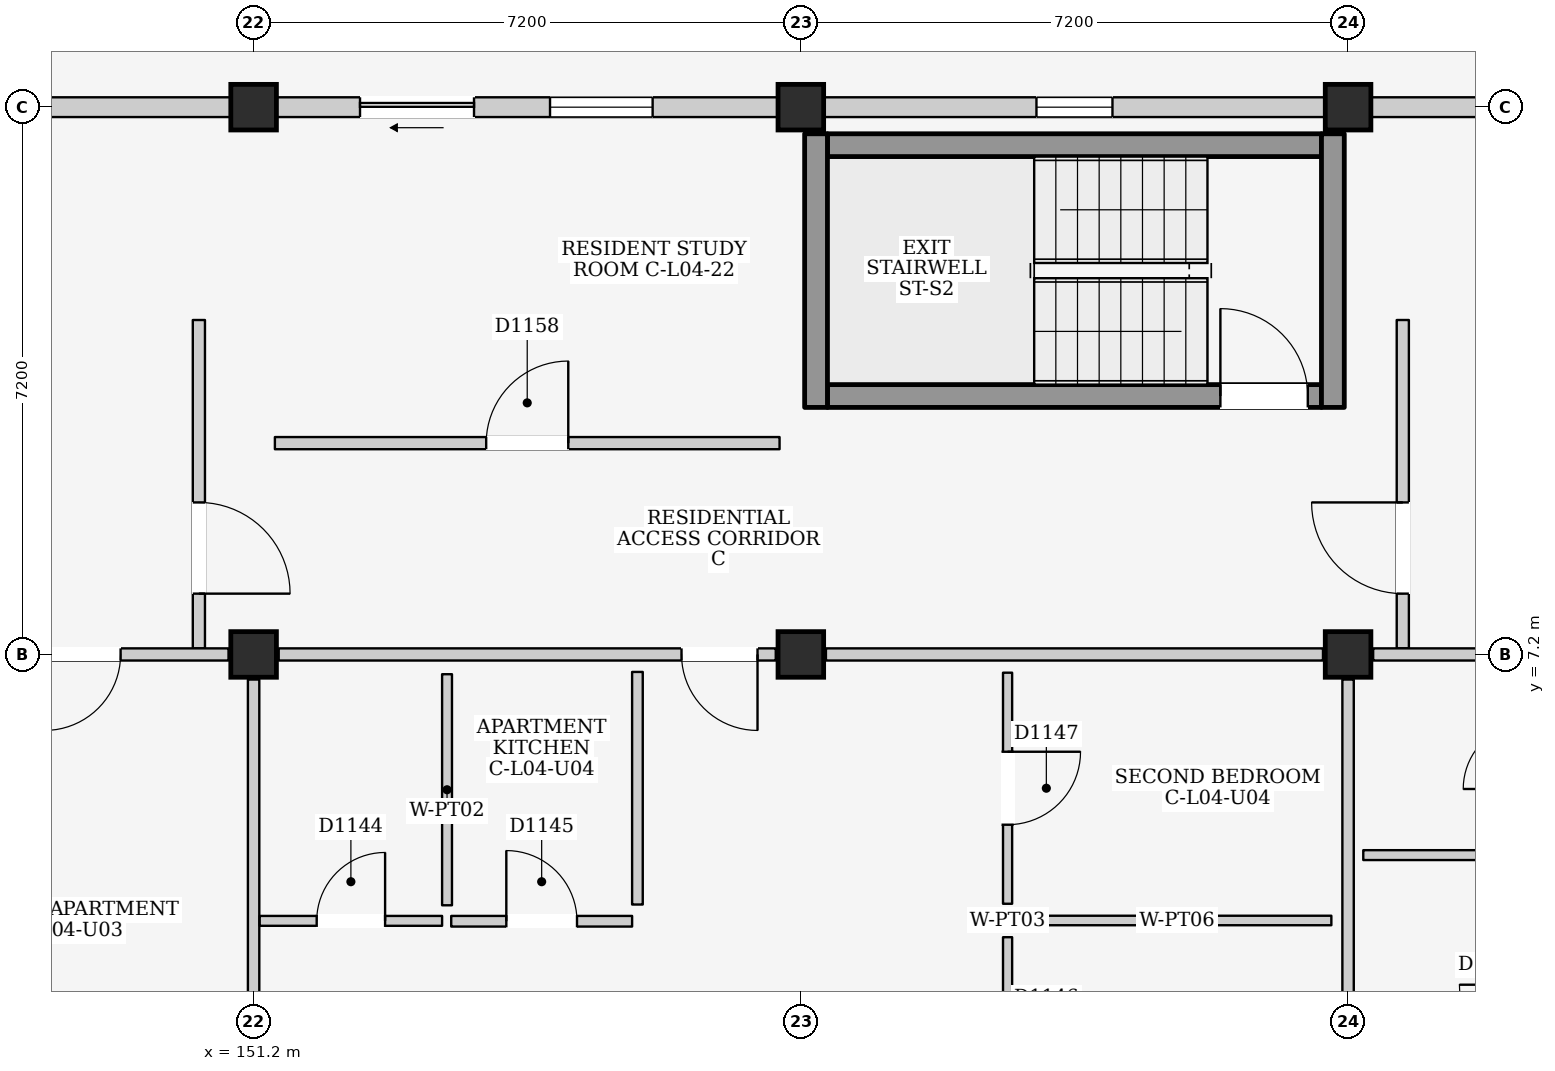
"""IFC4 building model, lengths in metres.
Left out: names, types, materials, properties, quantities, classifications, styles, units other than length and angle.
Written with IfcOpenShell. Run it as: python <this file> out.ifc"""

import sys

from ifc_helpers import new_model, si_unit, direction, frame, frame_2d, origin, origin_2d, place, context, subcontext, project, spatial, rectangle, extrude, element, fill, save


model = new_model("IFC4")
c1 = context("Model", 3, precision=1e-05, world=origin(), true_north=direction((0.0, 1.0)))
c2 = subcontext(c1, "Body", "Model", "MODEL_VIEW")
j1 = project(units=[si_unit("LENGTHUNIT", "METRE"), si_unit("PLANEANGLEUNIT", "RADIAN")], contexts=[c1])
p1 = place(None, origin())
s1 = spatial("IfcSite", under=j1, at=p1, CompositionType="ELEMENT")
p2 = place(p1, origin())
s2 = spatial("IfcBuilding", under=s1, at=p2, CompositionType="ELEMENT")
p3 = place(p2, frame((0.0, 0.0, 15.4)))
s3 = spatial("IfcBuildingStorey", under=s2, at=p3, CompositionType="ELEMENT", Elevation=15.4)
for number, where, z_axis, x_axis in (
    (1, (151.2, 7.2, 0.0), (0.0, 0.0, 1.0), (1.0, 0.0, 0.0)),
    (2, (151.2, 14.4, 0.0), (0.0, 0.0, 1.0), (1.0, 0.0, 0.0)),
    (3, (158.4, 7.2, 0.0), (0.0, 0.0, 1.0), (1.0, 0.0, 0.0)),
    (4, (158.4, 14.4, 0.0), (0.0, 0.0, 1.0), (1.0, 0.0, 0.0)),
    (5, (165.6, 7.2, 0.0), (0.0, 0.0, 1.0), (1.0, 0.0, 0.0)),
    (6, (165.6, 14.4, 0.0), (0.0, 0.0, 1.0), (1.0, 0.0, 0.0)),
):
    element("IfcColumn", number, at=place(p3, frame(where, z_axis=z_axis, x_axis=x_axis)), inside=s3, PredefinedType="COLUMN", context=c2, shape_type="SweptSolid", body=[
        extrude(rectangle(XDim=0.6, YDim=0.6, at=origin_2d()), origin(), (0.0, 0.0, 1.0), 3.2),
    ])
p4 = place(p3, frame((144.3, 14.4, 0.0), z_axis=(0.0, 0.0, 1.0), x_axis=(1.0, 0.0, 0.0)))
e7 = element("IfcWall", 7, at=p4, inside=s3, PredefinedType="ELEMENTEDWALL", context=c2, shape_type="SweptSolid", body=[
    extrude(rectangle(XDim=6.6, YDim=0.26, at=frame_2d((3.3, 0.0))), origin(), (0.0, 0.0, 1.0), 2.335),
])
p5 = place(p4, frame((2.8, 0.0, 1.2)))
e8 = element("IfcOpeningElement", 8, at=p5, cuts=e7, PredefinedType="OPENING", context=c2, shape_type="SweptSolid", body=[
    extrude(rectangle(XDim=1.0, YDim=0.9, at=frame_2d((0.5, 0.45))), frame((0.0, 0.145, 0.0), z_axis=(0.0, -1.0, 0.0), x_axis=(1.0, 0.0, 0.0)), (0.0, 0.0, 1.0), 0.29),
])
p6 = place(p3, frame((151.5, 14.4, 0.0), z_axis=(0.0, 0.0, 1.0), x_axis=(1.0, 0.0, 0.0)))
e9 = element("IfcWall", 9, at=p6, inside=s3, PredefinedType="ELEMENTEDWALL", context=c2, shape_type="SweptSolid", body=[
    extrude(rectangle(XDim=6.6, YDim=0.26, at=frame_2d((3.3, 0.0))), origin(), (0.0, 0.0, 1.0), 2.335),
])
p7 = place(p6, frame((1.1, 0.0, 0.0)))
e10 = element("IfcOpeningElement", 10, at=p7, cuts=e9, PredefinedType="OPENING", context=c2, shape_type="SweptSolid", body=[
    extrude(rectangle(XDim=1.5, YDim=2.12, at=frame_2d((0.75, 1.06))), frame((0.0, 0.145, 0.0), z_axis=(0.0, -1.0, 0.0), x_axis=(1.0, 0.0, 0.0)), (0.0, 0.0, 1.0), 0.29),
])
p8 = place(p6, frame((3.6, 0.0, 0.725)))
e11 = element("IfcOpeningElement", 11, at=p8, cuts=e9, PredefinedType="OPENING", context=c2, shape_type="SweptSolid", body=[
    extrude(rectangle(XDim=1.35, YDim=1.5, at=frame_2d((0.675, 0.75))), frame((0.0, 0.145, 0.0), z_axis=(0.0, -1.0, 0.0), x_axis=(1.0, 0.0, 0.0)), (0.0, 0.0, 1.0), 0.29),
])
p9 = place(p3, frame((158.7, 14.4, 0.0), z_axis=(0.0, 0.0, 1.0), x_axis=(1.0, 0.0, 0.0)))
e12 = element("IfcWall", 12, at=p9, inside=s3, PredefinedType="ELEMENTEDWALL", context=c2, shape_type="SweptSolid", body=[
    extrude(rectangle(XDim=6.6, YDim=0.26, at=frame_2d((3.3, 0.0))), origin(), (0.0, 0.0, 1.0), 2.335),
])
p10 = place(p9, frame((2.8, 0.0, 1.2)))
e13 = element("IfcOpeningElement", 13, at=p10, cuts=e12, PredefinedType="OPENING", context=c2, shape_type="SweptSolid", body=[
    extrude(rectangle(XDim=1.0, YDim=0.9, at=frame_2d((0.5, 0.45))), frame((0.0, 0.145, 0.0), z_axis=(0.0, -1.0, 0.0), x_axis=(1.0, 0.0, 0.0)), (0.0, 0.0, 1.0), 0.29),
])
p11 = place(p3, frame((165.9, 14.4, 0.0), z_axis=(0.0, 0.0, 1.0), x_axis=(1.0, 0.0, 0.0)))
e14 = element("IfcWall", 14, at=p11, inside=s3, PredefinedType="ELEMENTEDWALL", context=c2, shape_type="SweptSolid", body=[
    extrude(rectangle(XDim=6.6, YDim=0.26, at=frame_2d((3.3, 0.0))), origin(), (0.0, 0.0, 1.0), 2.335),
])
p12 = place(p11, frame((2.8, 0.0, 1.2)))
e15 = element("IfcOpeningElement", 15, at=p12, cuts=e14, PredefinedType="OPENING", context=c2, shape_type="SweptSolid", body=[
    extrude(rectangle(XDim=1.0, YDim=0.9, at=frame_2d((0.5, 0.45))), frame((0.0, 0.145, 0.0), z_axis=(0.0, -1.0, 0.0), x_axis=(1.0, 0.0, 0.0)), (0.0, 0.0, 1.0), 0.29),
])
p13 = place(p3, frame((150.48, 7.28, 0.0), z_axis=(0.0, 0.0, 1.0), x_axis=(0.0, 1.0, 0.0)))
e16 = element("IfcWall", 16, at=p13, inside=s3, PredefinedType="PARTITIONING", context=c2, shape_type="SweptSolid", body=[
    extrude(rectangle(XDim=4.32, YDim=0.16, at=frame_2d((2.16, 0.0))), origin(), (0.0, 0.0, 1.0), 2.95),
])
p14 = place(p13, frame((0.72, 0.0, 0.0)))
e17 = element("IfcOpeningElement", 17, at=p14, cuts=e16, PredefinedType="OPENING", context=c2, shape_type="SweptSolid", body=[
    extrude(rectangle(XDim=1.2, YDim=2.2, at=frame_2d((0.6, 1.1))), frame((0.0, 0.095, 0.0), z_axis=(0.0, -1.0, 0.0), x_axis=(1.0, 0.0, 0.0)), (0.0, 0.0, 1.0), 0.19),
])
p15 = place(p3, frame((158.75, 10.6, 0.0), z_axis=(0.0, 0.0, 1.0), x_axis=(1.0, 0.0, 0.0)))
e18 = element("IfcWall", 18, at=p15, inside=s3, PredefinedType="SHEAR", context=c2, shape_type="SweptSolid", body=[
    extrude(rectangle(XDim=6.5, YDim=0.3, at=frame_2d((3.25, 0.0))), origin(), (0.0, 0.0, 1.0), 2.95),
])
p16 = place(p15, frame((5.17, 0.0, 0.0)))
e19 = element("IfcOpeningElement", 19, at=p16, cuts=e18, PredefinedType="OPENING", context=c2, shape_type="SweptSolid", body=[
    extrude(rectangle(XDim=1.15, YDim=2.2, at=frame_2d((0.575, 1.1))), frame((0.0, 0.165, 0.0), z_axis=(0.0, -1.0, 0.0), x_axis=(1.0, 0.0, 0.0)), (0.0, 0.0, 1.0), 0.33),
])
p17 = place(p3, frame((158.75, 13.9, 0.0), z_axis=(0.0, 0.0, 1.0), x_axis=(1.0, 0.0, 0.0)))
e20 = element("IfcWall", 20, at=p17, inside=s3, PredefinedType="SHEAR", context=c2, shape_type="SweptSolid", body=[
    extrude(rectangle(XDim=6.5, YDim=0.3, at=frame_2d((3.25, 0.0))), origin(), (0.0, 0.0, 1.0), 2.95),
])
for number, where, z_axis, x_axis in (
    (21, (158.6, 10.45, 0.0), (0.0, 0.0, 1.0), (0.0, 1.0, 0.0)),
    (22, (165.4, 10.45, 0.0), (0.0, 0.0, 1.0), (0.0, 1.0, 0.0)),
):
    element("IfcWall", number, at=place(p3, frame(where, z_axis=z_axis, x_axis=x_axis)), inside=s3, PredefinedType="SHEAR", context=c2, shape_type="SweptSolid", body=[
        extrude(rectangle(XDim=3.6, YDim=0.3, at=frame_2d((1.8, 0.0))), origin(), (0.0, 0.0, 1.0), 2.95),
    ])
p18 = place(p3, frame((166.32, 7.28, 0.0), z_axis=(0.0, 0.0, 1.0), x_axis=(0.0, 1.0, 0.0)))
e23 = element("IfcWall", 23, at=p18, inside=s3, PredefinedType="PARTITIONING", context=c2, shape_type="SweptSolid", body=[
    extrude(rectangle(XDim=4.32, YDim=0.16, at=frame_2d((2.16, 0.0))), origin(), (0.0, 0.0, 1.0), 2.95),
])
p19 = place(p18, frame((0.72, 0.0, 0.0)))
e24 = element("IfcOpeningElement", 24, at=p19, cuts=e23, PredefinedType="OPENING", context=c2, shape_type="SweptSolid", body=[
    extrude(rectangle(XDim=1.2, YDim=2.2, at=frame_2d((0.6, 1.1))), frame((0.0, 0.095, 0.0), z_axis=(0.0, -1.0, 0.0), x_axis=(1.0, 0.0, 0.0)), (0.0, 0.0, 1.0), 0.19),
])
p20 = place(p3, frame((144.33, 7.2, 0.0), z_axis=(0.0, 0.0, 1.0), x_axis=(1.0, 0.0, 0.0)))
e25 = element("IfcWall", 25, at=p20, inside=s3, PredefinedType="PARTITIONING", context=c2, shape_type="SweptSolid", body=[
    extrude(rectangle(XDim=6.54, YDim=0.16, at=frame_2d((3.27, 0.0))), origin(), (0.0, 0.0, 1.0), 2.335),
])
p21 = place(p20, frame((4.12, 0.0, 0.0)))
e26 = element("IfcOpeningElement", 26, at=p21, cuts=e25, PredefinedType="OPENING", context=c2, shape_type="SweptSolid", body=[
    extrude(rectangle(XDim=1.0, YDim=2.15, at=frame_2d((0.5, 1.075))), frame((0.0, 0.095, 0.0), z_axis=(0.0, -1.0, 0.0), x_axis=(1.0, 0.0, 0.0)), (0.0, 0.0, 1.0), 0.19),
])
p22 = place(p3, frame((151.2, 0.33, 0.0), z_axis=(0.0, 0.0, 1.0), x_axis=(0.0, 1.0, 0.0)))
e27 = element("IfcWall", 27, at=p22, inside=s3, PredefinedType="PARTITIONING", context=c2, shape_type="SweptSolid", body=[
    extrude(rectangle(XDim=6.54, YDim=0.15, at=frame_2d((3.27, 0.0))), origin(), (0.0, 0.0, 1.0), 2.385),
])
p23 = place(p3, frame((151.53, 7.2, 0.0), z_axis=(0.0, 0.0, 1.0), x_axis=(1.0, 0.0, 0.0)))
e28 = element("IfcWall", 28, at=p23, inside=s3, PredefinedType="PARTITIONING", context=c2, shape_type="SweptSolid", body=[
    extrude(rectangle(XDim=6.54, YDim=0.16, at=frame_2d((3.27, 0.0))), origin(), (0.0, 0.0, 1.0), 2.335),
])
p24 = place(p23, frame((5.3, 0.0, 0.0)))
e29 = element("IfcOpeningElement", 29, at=p24, cuts=e28, PredefinedType="OPENING", context=c2, shape_type="SweptSolid", body=[
    extrude(rectangle(XDim=1.0, YDim=2.15, at=frame_2d((0.5, 1.075))), frame((0.0, 0.095, 0.0), z_axis=(0.0, -1.0, 0.0), x_axis=(1.0, 0.0, 0.0)), (0.0, 0.0, 1.0), 0.19),
])
p25 = place(p3, frame((158.73, 7.2, 0.0), z_axis=(0.0, 0.0, 1.0), x_axis=(1.0, 0.0, 0.0)))
e30 = element("IfcWall", 30, at=p25, inside=s3, PredefinedType="PARTITIONING", context=c2, shape_type="SweptSolid", body=[
    extrude(rectangle(XDim=6.54, YDim=0.16, at=frame_2d((3.27, 0.0))), origin(), (0.0, 0.0, 1.0), 2.335),
])
p26 = place(p3, frame((165.6, 0.33, 0.0), z_axis=(0.0, 0.0, 1.0), x_axis=(0.0, 1.0, 0.0)))
e31 = element("IfcWall", 31, at=p26, inside=s3, PredefinedType="PARTITIONING", context=c2, shape_type="SweptSolid", body=[
    extrude(rectangle(XDim=6.54, YDim=0.15, at=frame_2d((3.27, 0.0))), origin(), (0.0, 0.0, 1.0), 2.385),
])
p27 = place(p3, frame((151.28, 3.695, 0.0), z_axis=(0.0, 0.0, 1.0), x_axis=(1.0, 0.0, 0.0)))
e32 = element("IfcWall", 32, at=p27, inside=s3, PredefinedType="PARTITIONING", context=c2, shape_type="SweptSolid", body=[
    extrude(rectangle(XDim=2.4, YDim=0.13, at=frame_2d((1.2, 0.0))), origin(), (0.0, 0.0, 1.0), 2.95),
])
p28 = place(p27, frame((0.75, 0.0, 0.0)))
e33 = element("IfcOpeningElement", 33, at=p28, cuts=e32, PredefinedType="OPENING", context=c2, shape_type="SweptSolid", body=[
    extrude(rectangle(XDim=0.9, YDim=2.1, at=frame_2d((0.45, 1.05))), frame((0.0, 0.08, 0.0), z_axis=(0.0, -1.0, 0.0), x_axis=(1.0, 0.0, 0.0)), (0.0, 0.0, 1.0), 0.16),
])
p29 = place(p3, frame((153.745, 3.9, 0.0), z_axis=(0.0, 0.0, 1.0), x_axis=(0.0, 1.0, 0.0)))
e34 = element("IfcWall", 34, at=p29, inside=s3, PredefinedType="PARTITIONING", context=c2, shape_type="SweptSolid", body=[
    extrude(rectangle(XDim=3.04, YDim=0.13, at=frame_2d((1.52, 0.0))), origin(), (0.0, 0.0, 1.0), 2.95),
])
p30 = place(p3, frame((153.8, 3.69, 0.0), z_axis=(0.0, 0.0, 1.0), x_axis=(1.0, 0.0, 0.0)))
e35 = element("IfcWall", 35, at=p30, inside=s3, PredefinedType="PARTITIONING", context=c2, shape_type="SweptSolid", body=[
    extrude(rectangle(XDim=2.38, YDim=0.14, at=frame_2d((1.19, 0.0))), origin(), (0.0, 0.0, 1.0), 2.95),
])
p31 = place(p30, frame((0.725, 0.0, 0.0)))
e36 = element("IfcOpeningElement", 36, at=p31, cuts=e35, PredefinedType="OPENING", context=c2, shape_type="SweptSolid", body=[
    extrude(rectangle(XDim=0.93, YDim=2.14, at=frame_2d((0.465, 1.07))), frame((0.0, 0.085, 0.0), z_axis=(0.0, -1.0, 0.0), x_axis=(1.0, 0.0, 0.0)), (0.0, 0.0, 1.0), 0.17),
])
p32 = place(p3, frame((156.25, 3.91, 0.0), z_axis=(0.0, 0.0, 1.0), x_axis=(0.0, 1.0, 0.0)))
e37 = element("IfcWall", 37, at=p32, inside=s3, PredefinedType="PARTITIONING", context=c2, shape_type="SweptSolid", body=[
    extrude(rectangle(XDim=3.06, YDim=0.14, at=frame_2d((1.53, 0.0))), origin(), (0.0, 0.0, 1.0), 2.95),
])
p33 = place(p3, frame((161.12, 0.44, 0.0), z_axis=(0.0, 0.0, 1.0), x_axis=(0.0, 1.0, 0.0)))
e38 = element("IfcWall", 38, at=p33, inside=s3, PredefinedType="PARTITIONING", context=c2, shape_type="SweptSolid", body=[
    extrude(rectangle(XDim=3.04, YDim=0.12, at=frame_2d((1.52, 0.0))), origin(), (0.0, 0.0, 1.0), 2.95),
])
p34 = place(p33, frame((1.045, 0.0, 0.0)))
e39 = element("IfcOpeningElement", 39, at=p34, cuts=e38, PredefinedType="OPENING", context=c2, shape_type="SweptSolid", body=[
    extrude(rectangle(XDim=0.95, YDim=2.15, at=frame_2d((0.475, 1.075))), frame((0.0, 0.075, 0.0), z_axis=(0.0, -1.0, 0.0), x_axis=(1.0, 0.0, 0.0)), (0.0, 0.0, 1.0), 0.15),
])
p35 = place(p3, frame((161.32, 3.7, 0.0), z_axis=(0.0, 0.0, 1.0), x_axis=(1.0, 0.0, 0.0)))
e40 = element("IfcWall", 40, at=p35, inside=s3, PredefinedType="PARTITIONING", context=c2, shape_type="SweptSolid", body=[
    extrude(rectangle(XDim=4.06, YDim=0.125, at=frame_2d((2.03, 0.0))), origin(), (0.0, 0.0, 1.0), 2.95),
])
p36 = place(p3, frame((161.12, 3.92, 0.0), z_axis=(0.0, 0.0, 1.0), x_axis=(0.0, 1.0, 0.0)))
e41 = element("IfcWall", 41, at=p36, inside=s3, PredefinedType="PARTITIONING", context=c2, shape_type="SweptSolid", body=[
    extrude(rectangle(XDim=3.04, YDim=0.12, at=frame_2d((1.52, 0.0))), origin(), (0.0, 0.0, 1.0), 2.95),
])
p37 = place(p36, frame((1.04, 0.0, 0.0)))
e42 = element("IfcOpeningElement", 42, at=p37, cuts=e41, PredefinedType="OPENING", context=c2, shape_type="SweptSolid", body=[
    extrude(rectangle(XDim=0.96, YDim=2.15, at=frame_2d((0.48, 1.075))), frame((0.0, 0.075, 0.0), z_axis=(0.0, -1.0, 0.0), x_axis=(1.0, 0.0, 0.0)), (0.0, 0.0, 1.0), 0.15),
])
p38 = place(p3, frame((165.93, 7.2, 0.0), z_axis=(0.0, 0.0, 1.0), x_axis=(1.0, 0.0, 0.0)))
e43 = element("IfcWall", 43, at=p38, inside=s3, PredefinedType="PARTITIONING", context=c2, shape_type="SweptSolid", body=[
    extrude(rectangle(XDim=6.54, YDim=0.16, at=frame_2d((3.27, 0.0))), origin(), (0.0, 0.0, 1.0), 2.335),
])
p39 = place(p38, frame((4.12, 0.0, 0.0)))
e44 = element("IfcOpeningElement", 44, at=p39, cuts=e43, PredefinedType="OPENING", context=c2, shape_type="SweptSolid", body=[
    extrude(rectangle(XDim=1.0, YDim=2.15, at=frame_2d((0.5, 1.075))), frame((0.0, 0.095, 0.0), z_axis=(0.0, -1.0, 0.0), x_axis=(1.0, 0.0, 0.0)), (0.0, 0.0, 1.0), 0.19),
])
p40 = place(p3, frame((165.8, 4.56, 0.0), z_axis=(0.0, 0.0, 1.0), x_axis=(1.0, 0.0, 0.0)))
e45 = element("IfcWall", 45, at=p40, inside=s3, PredefinedType="PARTITIONING", context=c2, shape_type="SweptSolid", body=[
    extrude(rectangle(XDim=2.05, YDim=0.13, at=frame_2d((1.025, 0.0))), origin(), (0.0, 0.0, 1.0), 2.95),
])
p41 = place(p3, frame((151.48, 9.98, 0.0), z_axis=(0.0, 0.0, 1.0), x_axis=(1.0, 0.0, 0.0)))
e46 = element("IfcWall", 46, at=p41, inside=s3, PredefinedType="PARTITIONING", context=c2, shape_type="SweptSolid", body=[
    extrude(rectangle(XDim=6.64, YDim=0.16, at=frame_2d((3.32, 0.0))), origin(), (0.0, 0.0, 1.0), 2.95),
])
p42 = place(p41, frame((2.78, 0.0, 0.0)))
e47 = element("IfcOpeningElement", 47, at=p42, cuts=e46, PredefinedType="OPENING", context=c2, shape_type="SweptSolid", body=[
    extrude(rectangle(XDim=1.08, YDim=2.22, at=frame_2d((0.54, 1.11))), frame((0.0, 0.095, 0.0), z_axis=(0.0, -1.0, 0.0), x_axis=(1.0, 0.0, 0.0)), (0.0, 0.0, 1.0), 0.19),
])
p43 = place(p7, frame((1.5, 0.0, 0.0), z_axis=(0.0, 0.0, 1.0), x_axis=(-1.0, 0.0, 0.0)))
e48 = element("IfcDoor", 48, at=p43, inside=s3, OperationType="SLIDING_TO_LEFT", PredefinedType="DOOR", context=c2, shape_type="SweptSolid", body=[
    extrude(rectangle(XDim=1.5, YDim=2.12, at=frame_2d((0.75, 1.06))), frame((0.0, 0.025, 0.0), z_axis=(0.0, -1.0, 0.0), x_axis=(1.0, 0.0, 0.0)), (0.0, 0.0, 1.0), 0.05),
])
fill(e10, e48)
p44 = place(p8, origin())
e49 = element("IfcWindow", 49, at=p44, inside=s3, PartitioningType="SINGLE_PANEL", PredefinedType="WINDOW", context=c2, shape_type="SweptSolid", body=[
    extrude(rectangle(XDim=1.35, YDim=1.5, at=frame_2d((0.675, 0.75))), frame((0.0, 0.03, 0.0), z_axis=(0.0, -1.0, 0.0), x_axis=(1.0, 0.0, 0.0)), (0.0, 0.0, 1.0), 0.06),
])
fill(e11, e49)
p45 = place(p10, origin())
e50 = element("IfcWindow", 50, at=p45, inside=s3, PartitioningType="SINGLE_PANEL", PredefinedType="WINDOW", context=c2, shape_type="SweptSolid", body=[
    extrude(rectangle(XDim=1.0, YDim=0.9, at=frame_2d((0.5, 0.45))), frame((0.0, 0.03, 0.0), z_axis=(0.0, -1.0, 0.0), x_axis=(1.0, 0.0, 0.0)), (0.0, 0.0, 1.0), 0.06),
])
fill(e13, e50)
p46 = place(p14, frame((1.2, 0.0, 0.0), z_axis=(0.0, 0.0, 1.0), x_axis=(-1.0, 0.0, 0.0)))
e51 = element("IfcDoor", 51, at=p46, inside=s3, OperationType="SINGLE_SWING_RIGHT", PredefinedType="DOOR", context=c2, shape_type="SweptSolid", body=[
    extrude(rectangle(XDim=1.2, YDim=2.2, at=frame_2d((0.6, 1.1))), frame((0.0, 0.025, 0.0), z_axis=(0.0, -1.0, 0.0), x_axis=(1.0, 0.0, 0.0)), (0.0, 0.0, 1.0), 0.05),
])
fill(e17, e51)
p47 = place(p16, origin())
e52 = element("IfcDoor", 52, at=p47, inside=s3, OperationType="SINGLE_SWING_LEFT", PredefinedType="DOOR", context=c2, shape_type="SweptSolid", body=[
    extrude(rectangle(XDim=1.15, YDim=2.2, at=frame_2d((0.575, 1.1))), frame((0.0, 0.025, 0.0), z_axis=(0.0, -1.0, 0.0), x_axis=(1.0, 0.0, 0.0)), (0.0, 0.0, 1.0), 0.05),
])
fill(e19, e52)
p48 = place(p19, origin())
e53 = element("IfcDoor", 53, at=p48, inside=s3, OperationType="SINGLE_SWING_RIGHT", PredefinedType="DOOR", context=c2, shape_type="SweptSolid", body=[
    extrude(rectangle(XDim=1.2, YDim=2.2, at=frame_2d((0.6, 1.1))), frame((0.0, 0.025, 0.0), z_axis=(0.0, -1.0, 0.0), x_axis=(1.0, 0.0, 0.0)), (0.0, 0.0, 1.0), 0.05),
])
fill(e24, e53)
p49 = place(p21, frame((1.0, 0.0, 0.0), z_axis=(0.0, 0.0, 1.0), x_axis=(-1.0, 0.0, 0.0)))
e54 = element("IfcDoor", 54, at=p49, inside=s3, OperationType="SINGLE_SWING_RIGHT", PredefinedType="DOOR", context=c2, shape_type="SweptSolid", body=[
    extrude(rectangle(XDim=1.0, YDim=2.15, at=frame_2d((0.5, 1.075))), frame((0.0, 0.025, 0.0), z_axis=(0.0, -1.0, 0.0), x_axis=(1.0, 0.0, 0.0)), (0.0, 0.0, 1.0), 0.05),
])
fill(e26, e54)
p50 = place(p24, frame((1.0, 0.0, 0.0), z_axis=(0.0, 0.0, 1.0), x_axis=(-1.0, 0.0, 0.0)))
e55 = element("IfcDoor", 55, at=p50, inside=s3, OperationType="SINGLE_SWING_LEFT", PredefinedType="DOOR", context=c2, shape_type="SweptSolid", body=[
    extrude(rectangle(XDim=1.0, YDim=2.15, at=frame_2d((0.5, 1.075))), frame((0.0, 0.025, 0.0), z_axis=(0.0, -1.0, 0.0), x_axis=(1.0, 0.0, 0.0)), (0.0, 0.0, 1.0), 0.05),
])
fill(e29, e55)
p51 = place(p28, origin())
e56 = element("IfcDoor", 56, at=p51, inside=s3, OperationType="SINGLE_SWING_RIGHT", PredefinedType="DOOR", context=c2, shape_type="SweptSolid", body=[
    extrude(rectangle(XDim=0.9, YDim=2.1, at=frame_2d((0.45, 1.05))), frame((0.0, 0.025, 0.0), z_axis=(0.0, -1.0, 0.0), x_axis=(1.0, 0.0, 0.0)), (0.0, 0.0, 1.0), 0.05),
])
fill(e33, e56)
p52 = place(p31, origin())
e57 = element("IfcDoor", 57, at=p52, inside=s3, OperationType="SINGLE_SWING_LEFT", PredefinedType="DOOR", context=c2, shape_type="SweptSolid", body=[
    extrude(rectangle(XDim=0.93, YDim=2.14, at=frame_2d((0.465, 1.07))), frame((0.0, 0.025, 0.0), z_axis=(0.0, -1.0, 0.0), x_axis=(1.0, 0.0, 0.0)), (0.0, 0.0, 1.0), 0.05),
])
fill(e36, e57)
p53 = place(p37, frame((0.96, 0.0, 0.0), z_axis=(0.0, 0.0, 1.0), x_axis=(-1.0, 0.0, 0.0)))
e58 = element("IfcDoor", 58, at=p53, inside=s3, OperationType="SINGLE_SWING_LEFT", PredefinedType="DOOR", context=c2, shape_type="SweptSolid", body=[
    extrude(rectangle(XDim=0.96, YDim=2.15, at=frame_2d((0.48, 1.075))), frame((0.0, 0.025, 0.0), z_axis=(0.0, -1.0, 0.0), x_axis=(1.0, 0.0, 0.0)), (0.0, 0.0, 1.0), 0.05),
])
fill(e42, e58)
p54 = place(p42, origin())
e59 = element("IfcDoor", 59, at=p54, inside=s3, OperationType="SINGLE_SWING_RIGHT", PredefinedType="DOOR", context=c2, shape_type="SweptSolid", body=[
    extrude(rectangle(XDim=1.08, YDim=2.22, at=frame_2d((0.54, 1.11))), frame((0.0, 0.025, 0.0), z_axis=(0.0, -1.0, 0.0), x_axis=(1.0, 0.0, 0.0)), (0.0, 0.0, 1.0), 0.05),
])
fill(e47, e59)
save(model, sys.argv[1])
